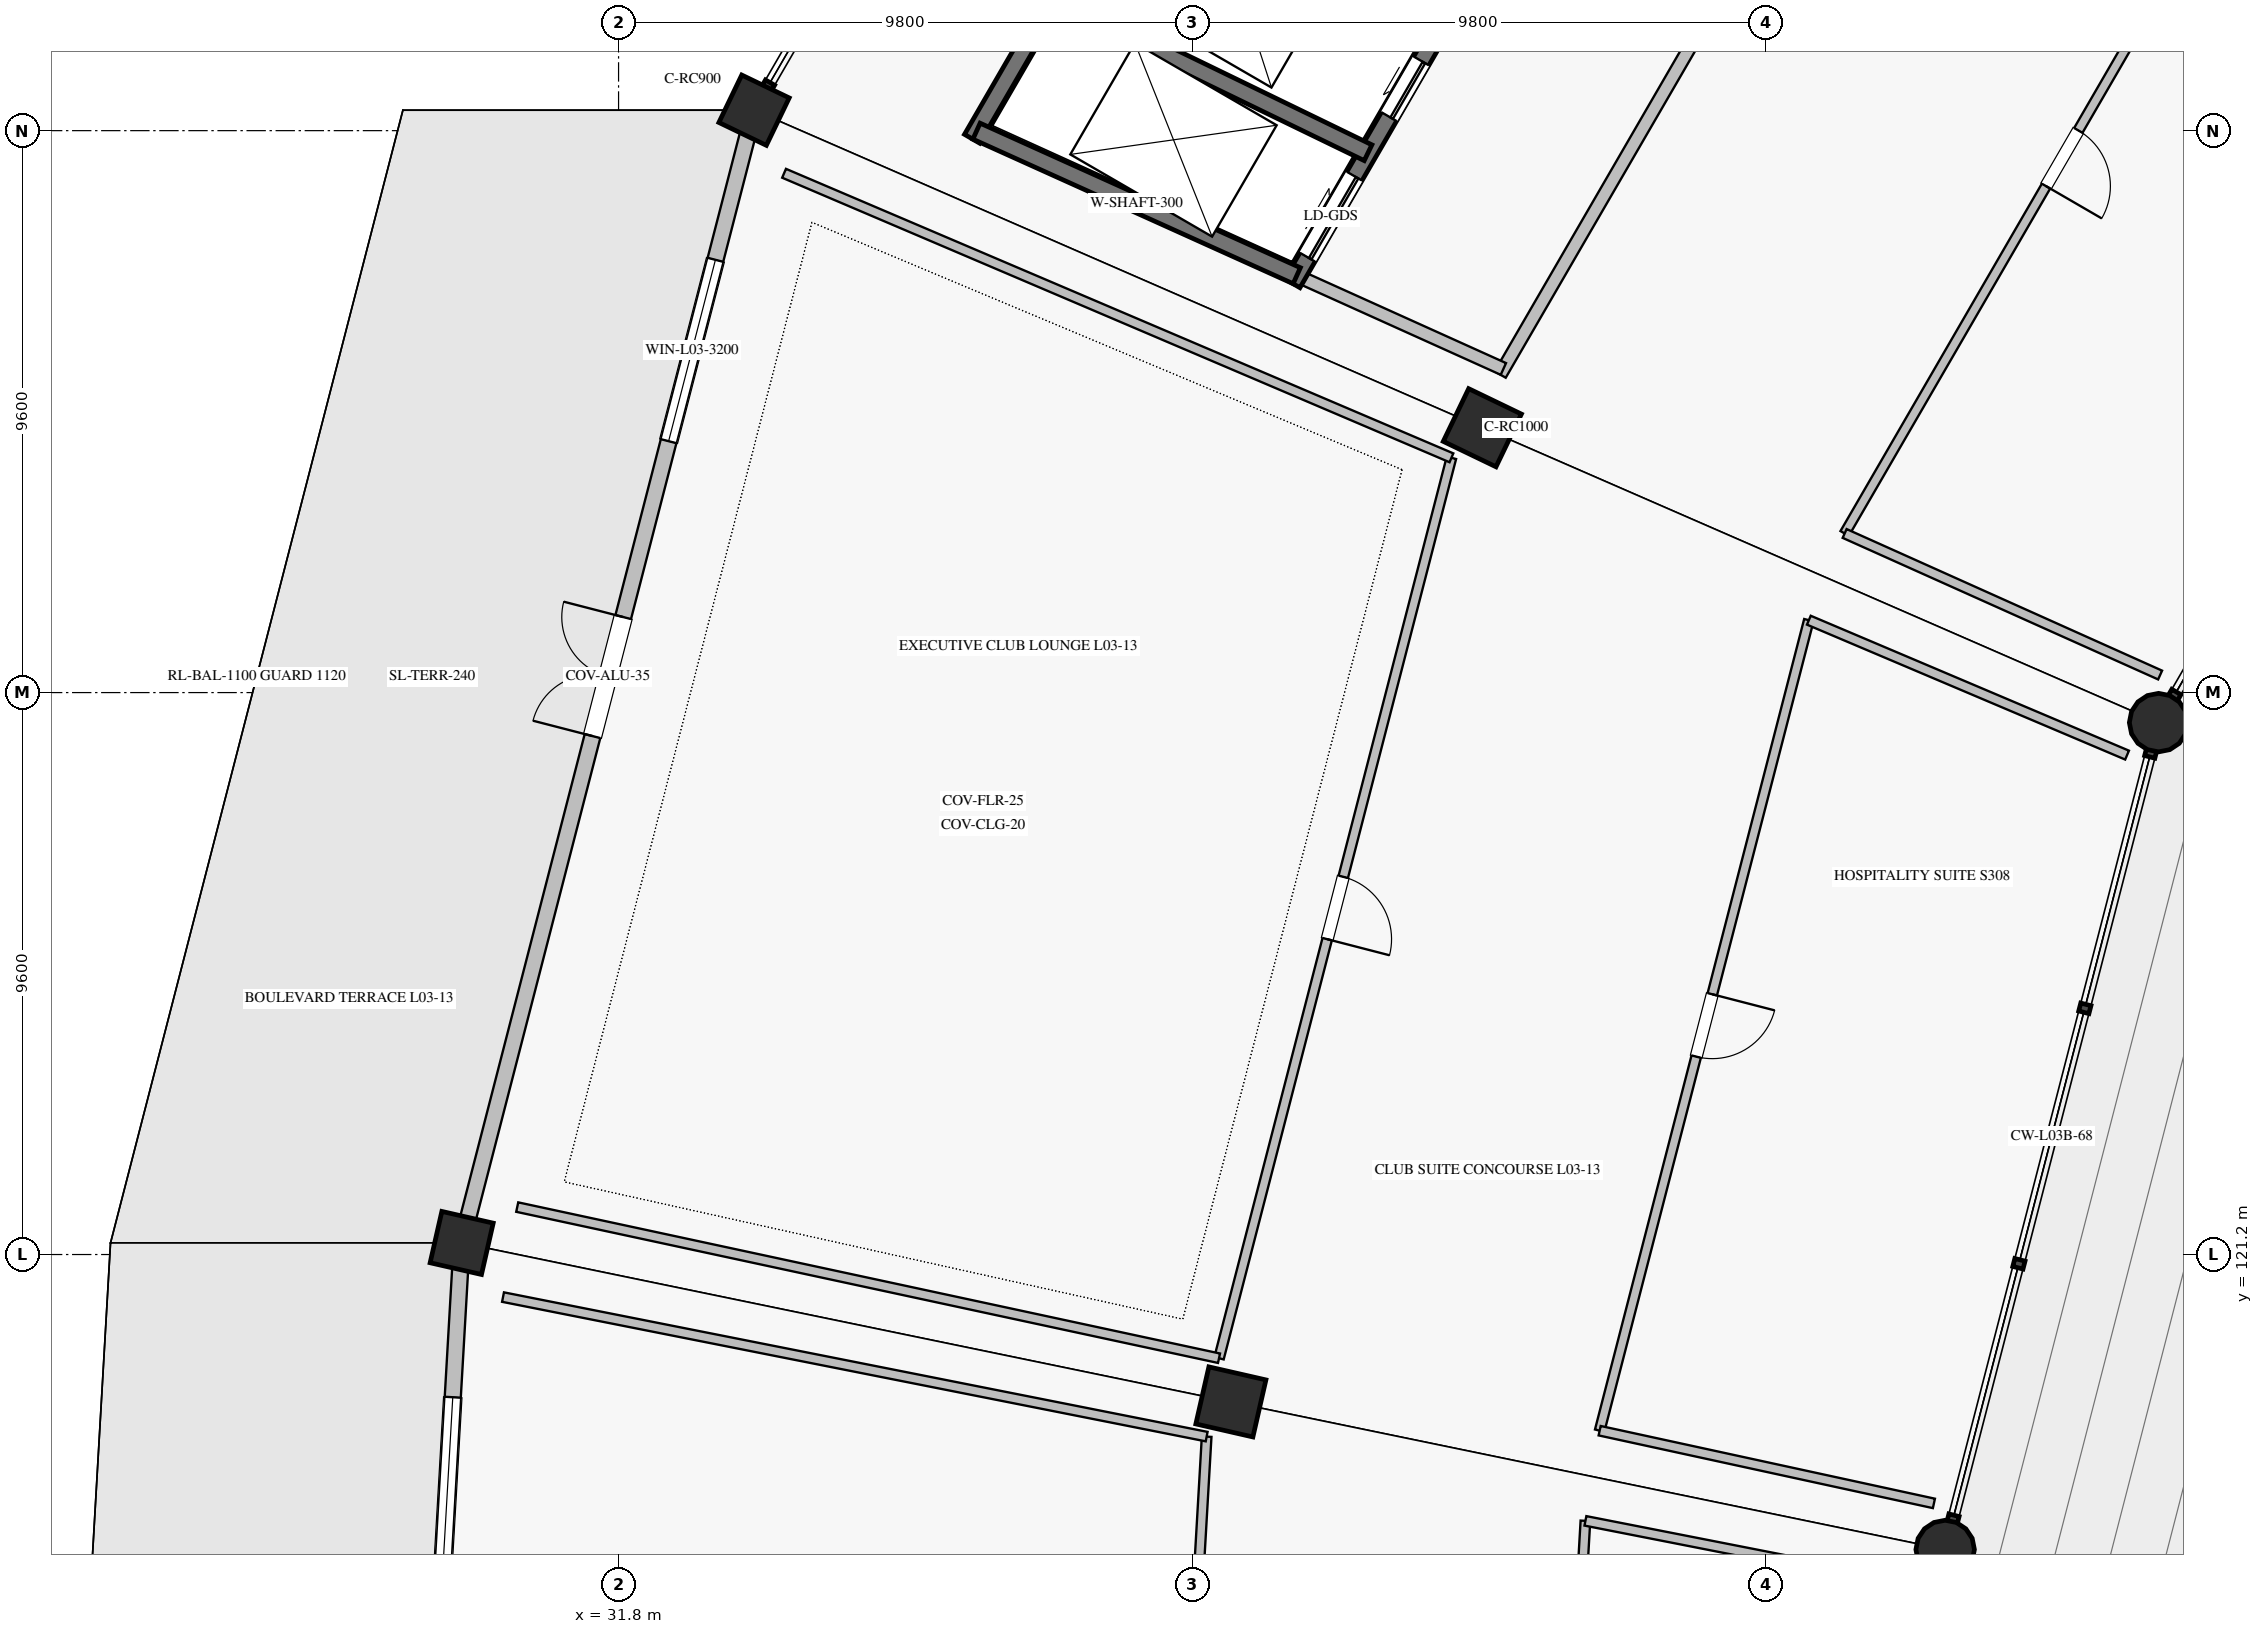
"""IFC4 building model, lengths in metres.
Left out: names, types, materials, properties, quantities, classifications, styles, units other than length and angle.
Written with IfcOpenShell. Run it as: python <this file> out.ifc"""

import sys

from ifc_helpers import new_model, si_unit, direction, frame, frame_2d, origin, origin_2d, place, context, subcontext, project, spatial, rectangle, circle, extrude, element, fill, save


model = new_model("IFC4")
c1 = context("Model", 3, precision=1e-05, world=origin(), true_north=direction((0.0, 1.0)))
c2 = subcontext(c1, "Body", "Model", "MODEL_VIEW")
j1 = project(units=[si_unit("LENGTHUNIT", "METRE"), si_unit("PLANEANGLEUNIT", "RADIAN")], contexts=[c1])
p1 = place(None, origin())
s1 = spatial("IfcSite", under=j1, at=p1, CompositionType="ELEMENT")
p2 = place(p1, origin())
s2 = spatial("IfcBuilding", under=s1, at=p2, CompositionType="ELEMENT")
p3 = place(p2, frame((0.0, 0.0, 15.64)))
s3 = spatial("IfcBuildingStorey", under=s2, at=p3, CompositionType="ELEMENT", Elevation=15.64)
for number, where, z_axis, x_axis in (
    (1, (58.114, 130.287, 0.0), (0.0, 0.0, 1.0), (-0.901, 0.434, 0.0)),
    (2, (54.467, 116.16, 0.0), (0.0, 0.0, 1.0), (-0.975, 0.223, 0.0)),
):
    element("IfcColumn", number, at=place(p3, frame(where, z_axis=z_axis, x_axis=x_axis)), inside=s3, PredefinedType="COLUMN", context=c2, shape_type="SweptSolid", body=[
        extrude(circle(Radius=0.5, at=origin_2d()), origin(), (0.0, 0.0, 1.0), 4.76),
    ])
for number, where, z_axis, x_axis in (
    (3, (46.559, 135.325, 0.0), (0.0, 0.0, 1.0), (-0.901, 0.434, 0.0)),
    (4, (42.262, 118.682, 0.0), (0.0, 0.0, 1.0), (-0.975, 0.223, 0.0)),
):
    element("IfcColumn", number, at=place(p3, frame(where, z_axis=z_axis, x_axis=x_axis)), inside=s3, PredefinedType="COLUMN", context=c2, shape_type="SweptSolid", body=[
        extrude(rectangle(XDim=1.0, YDim=1.0, at=origin_2d()), origin(), (0.0, 0.0, 1.0), 4.76),
    ])
for number, where, z_axis, x_axis in (
    (5, (34.115, 140.75, 0.0), (0.0, 0.0, 1.0), (-0.901, 0.434, 0.0)),
    (6, (29.119, 121.398, 0.0), (0.0, 0.0, 1.0), (-0.975, 0.223, 0.0)),
):
    element("IfcColumn", number, at=place(p3, frame(where, z_axis=z_axis, x_axis=x_axis)), inside=s3, PredefinedType="COLUMN", context=c2, shape_type="SweptSolid", body=[
        extrude(rectangle(XDim=0.9, YDim=0.9, at=origin_2d()), origin(), (0.0, 0.0, 1.0), 4.76),
    ])
p4 = place(p3, frame((34.005, 140.323, 0.0), z_axis=(0.0, 0.0, 1.0), x_axis=(-0.2499638116, -0.968255179635, 0.0)))
e7 = element("IfcWall", 7, at=p4, inside=s3, PredefinedType="SOLIDWALL", context=c2, shape_type="SweptSolid", body=[
    extrude(rectangle(XDim=19.106, YDim=0.275, at=frame_2d((9.553, 0.0))), origin(), (0.0, 0.0, 1.0), 3.81),
])
p5 = place(p4, frame((8.503, 0.0, 0.0)))
e8 = element("IfcOpeningElement", 8, at=p5, cuts=e7, PredefinedType="OPENING", context=c2, shape_type="SweptSolid", body=[
    extrude(rectangle(XDim=2.1, YDim=2.4, at=frame_2d((1.05, 1.2))), frame((0.0, 0.147, 0.0), z_axis=(0.0, -1.0, 0.0), x_axis=(1.0, 0.0, 0.0)), (0.0, 0.0, 1.0), 0.295),
])
p6 = place(p4, frame((2.2, 0.0, 0.9)))
e9 = element("IfcOpeningElement", 9, at=p6, cuts=e7, PredefinedType="OPENING", context=c2, shape_type="SweptSolid", body=[
    extrude(rectangle(XDim=3.2, YDim=2.2, at=frame_2d((1.6, 1.1))), frame((0.0, 0.147, 0.0), z_axis=(0.0, -1.0, 0.0), x_axis=(1.0, 0.0, 0.0)), (0.0, 0.0, 1.0), 0.295),
])
p7 = place(p3, frame((29.094, 120.958, 0.0), z_axis=(0.0, 0.0, 1.0), x_axis=(-0.05759325572, -0.998340130865, 0.0)))
e10 = element("IfcWall", 10, at=p7, inside=s3, PredefinedType="SOLIDWALL", context=c2, shape_type="SweptSolid", body=[
    extrude(rectangle(XDim=18.55, YDim=0.275, at=frame_2d((9.275, 0.0))), origin(), (0.0, 0.0, 1.0), 3.81),
])
p8 = place(p7, frame((8.225, 0.0, 0.0)))
e11 = element("IfcOpeningElement", 11, at=p8, cuts=e10, PredefinedType="OPENING", context=c2, shape_type="SweptSolid", body=[
    extrude(rectangle(XDim=2.1, YDim=2.4, at=frame_2d((1.05, 1.2))), frame((0.0, 0.147, 0.0), z_axis=(0.0, -1.0, 0.0), x_axis=(1.0, 0.0, 0.0)), (0.0, 0.0, 1.0), 0.295),
])
p9 = place(p7, frame((2.2, 0.0, 0.9)))
e12 = element("IfcOpeningElement", 12, at=p9, cuts=e10, PredefinedType="OPENING", context=c2, shape_type="SweptSolid", body=[
    extrude(rectangle(XDim=3.2, YDim=2.2, at=frame_2d((1.6, 1.1))), frame((0.0, 0.147, 0.0), z_axis=(0.0, -1.0, 0.0), x_axis=(1.0, 0.0, 0.0)), (0.0, 0.0, 1.0), 0.295),
])
p10 = place(p3, frame((45.9, 142.254, 0.0), z_axis=(0.0, 0.0, 1.0), x_axis=(-0.501629534056, -0.86508254552, 0.0)))
e13 = element("IfcWall", 13, at=p10, inside=s3, PredefinedType="SHEAR", context=c2, shape_type="SweptSolid", body=[
    extrude(rectangle(XDim=5.157, YDim=0.3, at=frame_2d((2.579, 0.0))), origin(), (0.0, 0.0, 1.0), 4.46),
])
p11 = place(p10, frame((0.766, 0.0, 0.0)))
e14 = element("IfcOpeningElement", 14, at=p11, cuts=e13, PredefinedType="OPENING", context=c2, shape_type="SweptSolid", body=[
    extrude(rectangle(XDim=1.1, YDim=2.2, at=frame_2d((0.55, 1.1))), frame((0.0, 0.16, 0.0), z_axis=(0.0, -1.0, 0.0), x_axis=(1.0, 0.0, 0.0)), (0.0, 0.0, 1.0), 0.32),
])
p12 = place(p10, frame((3.042, 0.0, 0.0)))
e15 = element("IfcOpeningElement", 15, at=p12, cuts=e13, PredefinedType="OPENING", context=c2, shape_type="SweptSolid", body=[
    extrude(rectangle(XDim=1.6, YDim=2.3, at=frame_2d((0.8, 1.15))), frame((0.0, 0.16, 0.0), z_axis=(0.0, -1.0, 0.0), x_axis=(1.0, 0.0, 0.0)), (0.0, 0.0, 1.0), 0.32),
])
p13 = place(p3, frame((40.595, 145.012, 0.0), z_axis=(0.0, 0.0, 1.0), x_axis=(-0.501630260479, -0.865082124293, 0.0)))
e16 = element("IfcWall", 16, at=p13, inside=s3, PredefinedType="SHEAR", context=c2, shape_type="SweptSolid", body=[
    extrude(rectangle(XDim=5.491, YDim=0.3, at=frame_2d((2.746, 0.0))), origin(), (0.0, 0.0, 1.0), 4.46),
])
p14 = place(p3, frame((43.388, 137.922, 0.0), z_axis=(0.0, 0.0, 1.0), x_axis=(-0.911521602376, 0.41125219562, 0.0)))
e17 = element("IfcWall", 17, at=p14, inside=s3, PredefinedType="SHEAR", context=c2, shape_type="SweptSolid", body=[
    extrude(rectangle(XDim=6.004, YDim=0.3, at=frame_2d((3.002, 0.0))), origin(), (0.0, 0.0, 1.0), 4.46),
])
p15 = place(p3, frame((44.606, 140.023, 0.0), z_axis=(0.0, 0.0, 1.0), x_axis=(-0.899759302591, 0.436386522936, 0.0)))
e18 = element("IfcWall", 18, at=p15, inside=s3, PredefinedType="SHEAR", context=c2, shape_type="SweptSolid", body=[
    extrude(rectangle(XDim=5.989, YDim=0.3, at=frame_2d((2.995, 0.0))), origin(), (0.0, 0.0, 1.0), 4.46),
])
p16 = place(p3, frame((54.944, 150.17, 0.0), z_axis=(0.0, 0.0, 1.0), x_axis=(-0.501612626242, -0.865092349518, 0.0)))
e19 = element("IfcWall", 19, at=p16, inside=s3, PredefinedType="SOLIDWALL", context=c2, shape_type="SweptSolid", body=[
    extrude(rectangle(XDim=16.11, YDim=0.22, at=frame_2d((8.055, 0.0))), origin(), (0.0, 0.0, 1.0), 4.46),
])
p17 = place(p16, frame((6.511, 0.0, 0.0)))
e20 = element("IfcOpeningElement", 20, at=p17, cuts=e19, PredefinedType="OPENING", context=c2, shape_type="SweptSolid", body=[
    extrude(rectangle(XDim=1.5, YDim=2.2, at=frame_2d((0.75, 1.1))), frame((0.0, 0.12, 0.0), z_axis=(0.0, -1.0, 0.0), x_axis=(1.0, 0.0, 0.0)), (0.0, 0.0, 1.0), 0.24),
])
p18 = place(p3, frame((46.918, 136.329, 0.0), z_axis=(0.0, 0.0, 1.0), x_axis=(-0.91149641055, 0.411308027582, 0.0)))
e21 = element("IfcWall", 21, at=p18, inside=s3, PredefinedType="SOLIDWALL", context=c2, shape_type="SweptSolid", body=[
    extrude(rectangle(XDim=3.873, YDim=0.22, at=frame_2d((1.937, 0.0))), origin(), (0.0, 0.0, 1.0), 4.46),
])
p19 = place(p3, frame((46.031, 134.811, 0.0), z_axis=(0.0, 0.0, 1.0), x_axis=(-0.249970043824, -0.968253570709, 0.0)))
e22 = element("IfcWall", 22, at=p19, inside=s3, PredefinedType="PARTITIONING", context=c2, shape_type="SweptSolid", body=[
    extrude(rectangle(XDim=15.887, YDim=0.165, at=frame_2d((7.943, 0.0))), origin(), (0.0, 0.0, 1.0), 3.78),
])
p20 = place(p19, frame((7.393, 0.0, 0.0)))
e23 = element("IfcOpeningElement", 23, at=p20, cuts=e22, PredefinedType="OPENING", context=c2, shape_type="SweptSolid", body=[
    extrude(rectangle(XDim=1.1, YDim=2.25, at=frame_2d((0.55, 1.125))), frame((0.0, 0.093, 0.0), z_axis=(0.0, -1.0, 0.0), x_axis=(1.0, 0.0, 0.0)), (0.0, 0.0, 1.0), 0.185),
])
p21 = place(p3, frame((46.031, 134.811, 0.0), z_axis=(0.0, 0.0, 1.0), x_axis=(-0.919905328402, 0.392140519173, 0.0)))
e24 = element("IfcWall", 24, at=p21, inside=s3, PredefinedType="PARTITIONING", context=c2, shape_type="SweptSolid", body=[
    extrude(rectangle(XDim=12.396, YDim=0.165, at=frame_2d((6.198, 0.0))), origin(), (0.0, 0.0, 1.0), 3.78),
])
p22 = place(p3, frame((42.06, 119.428, 0.0), z_axis=(0.0, 0.0, 1.0), x_axis=(-0.97759337709, 0.210502230558, 0.0)))
e25 = element("IfcWall", 25, at=p22, inside=s3, PredefinedType="PARTITIONING", context=c2, shape_type="SweptSolid", body=[
    extrude(rectangle(XDim=12.266, YDim=0.165, at=frame_2d((6.133, 0.0))), origin(), (0.0, 0.0, 1.0), 3.78),
])
p23 = place(p3, frame((41.848, 118.089, 0.0), z_axis=(0.0, 0.0, 1.0), x_axis=(-0.057603503798, -0.998339539611, 0.0)))
e26 = element("IfcWall", 26, at=p23, inside=s3, PredefinedType="PARTITIONING", context=c2, shape_type="SweptSolid", body=[
    extrude(rectangle(XDim=15.444, YDim=0.165, at=frame_2d((7.722, 0.0))), origin(), (0.0, 0.0, 1.0), 3.78),
])
p24 = place(p23, frame((6.922, 0.0, 0.0)))
e27 = element("IfcOpeningElement", 27, at=p24, cuts=e26, PredefinedType="OPENING", context=c2, shape_type="SweptSolid", body=[
    extrude(rectangle(XDim=1.6, YDim=2.3, at=frame_2d((0.8, 1.15))), frame((0.0, 0.093, 0.0), z_axis=(0.0, -1.0, 0.0), x_axis=(1.0, 0.0, 0.0)), (0.0, 0.0, 1.0), 0.185),
])
p25 = place(p3, frame((41.848, 118.089, 0.0), z_axis=(0.0, 0.0, 1.0), x_axis=(-0.980904167784, 0.194491680088, 0.0)))
e28 = element("IfcWall", 28, at=p25, inside=s3, PredefinedType="PARTITIONING", context=c2, shape_type="SweptSolid", body=[
    extrude(rectangle(XDim=12.257, YDim=0.165, at=frame_2d((6.128, 0.0))), origin(), (0.0, 0.0, 1.0), 3.78),
])
p26 = place(p3, frame((60.183, 146.339, 0.0), z_axis=(0.0, 0.0, 1.0), x_axis=(-0.501600484117, -0.865099389859, 0.0)))
e29 = element("IfcWall", 29, at=p26, inside=s3, PredefinedType="PARTITIONING", context=c2, shape_type="SweptSolid", body=[
    extrude(rectangle(XDim=14.82, YDim=0.165, at=frame_2d((7.41, 0.0))), origin(), (0.0, 0.0, 1.0), 3.78),
])
p27 = place(p26, frame((6.86, 0.0, 0.0)))
e30 = element("IfcOpeningElement", 30, at=p27, cuts=e29, PredefinedType="OPENING", context=c2, shape_type="SweptSolid", body=[
    extrude(rectangle(XDim=1.1, YDim=2.25, at=frame_2d((0.55, 1.125))), frame((0.0, 0.093, 0.0), z_axis=(0.0, -1.0, 0.0), x_axis=(1.0, 0.0, 0.0)), (0.0, 0.0, 1.0), 0.185),
])
p28 = place(p3, frame((52.75, 133.518, 0.0), z_axis=(0.0, 0.0, 1.0), x_axis=(0.912386411317, -0.409329984785, 0.0)))
e31 = element("IfcWall", 31, at=p28, inside=s3, PredefinedType="PARTITIONING", context=c2, shape_type="SweptSolid", body=[
    extrude(rectangle(XDim=5.908, YDim=0.165, at=frame_2d((2.954, 0.0))), origin(), (0.0, 0.0, 1.0), 3.78),
])
p29 = place(p3, frame((52.138, 132.037, 0.0), z_axis=(0.0, 0.0, 1.0), x_axis=(-0.24997612238, -0.968252001413, 0.0)))
e32 = element("IfcWall", 32, at=p29, inside=s3, PredefinedType="PARTITIONING", context=c2, shape_type="SweptSolid", body=[
    extrude(rectangle(XDim=14.3, YDim=0.165, at=frame_2d((7.15, 0.0))), origin(), (0.0, 0.0, 1.0), 3.78),
])
p30 = place(p29, frame((6.6, 0.0, 0.0)))
e33 = element("IfcOpeningElement", 33, at=p30, cuts=e32, PredefinedType="OPENING", context=c2, shape_type="SweptSolid", body=[
    extrude(rectangle(XDim=1.1, YDim=2.25, at=frame_2d((0.55, 1.125))), frame((0.0, 0.093, 0.0), z_axis=(0.0, -1.0, 0.0), x_axis=(1.0, 0.0, 0.0)), (0.0, 0.0, 1.0), 0.185),
])
p31 = place(p3, frame((52.138, 132.037, 0.0), z_axis=(0.0, 0.0, 1.0), x_axis=(0.920705147611, -0.390258928357, 0.0)))
e34 = element("IfcWall", 34, at=p31, inside=s3, PredefinedType="PARTITIONING", context=c2, shape_type="SweptSolid", body=[
    extrude(rectangle(XDim=5.906, YDim=0.165, at=frame_2d((2.953, 0.0))), origin(), (0.0, 0.0, 1.0), 3.78),
])
p32 = place(p3, frame((48.563, 118.19, 0.0), z_axis=(0.0, 0.0, 1.0), x_axis=(0.977149214651, -0.212554492557, 0.0)))
e35 = element("IfcWall", 35, at=p32, inside=s3, PredefinedType="PARTITIONING", context=c2, shape_type="SweptSolid", body=[
    extrude(rectangle(XDim=5.845, YDim=0.165, at=frame_2d((2.923, 0.0))), origin(), (0.0, 0.0, 1.0), 3.78),
])
p33 = place(p3, frame((48.32, 116.65, 0.0), z_axis=(0.0, 0.0, 1.0), x_axis=(-0.057600910845, -0.998339689219, 0.0)))
e36 = element("IfcWall", 36, at=p33, inside=s3, PredefinedType="PARTITIONING", context=c2, shape_type="SweptSolid", body=[
    extrude(rectangle(XDim=13.902, YDim=0.165, at=frame_2d((6.951, 0.0))), origin(), (0.0, 0.0, 1.0), 3.78),
])
p34 = place(p33, frame((6.401, 0.0, 0.0)))
e37 = element("IfcOpeningElement", 37, at=p34, cuts=e36, PredefinedType="OPENING", context=c2, shape_type="SweptSolid", body=[
    extrude(rectangle(XDim=1.1, YDim=2.25, at=frame_2d((0.55, 1.125))), frame((0.0, 0.093, 0.0), z_axis=(0.0, -1.0, 0.0), x_axis=(1.0, 0.0, 0.0)), (0.0, 0.0, 1.0), 0.185),
])
p35 = place(p3, frame((48.32, 116.65, 0.0), z_axis=(0.0, 0.0, 1.0), x_axis=(0.981299196532, -0.192488666901, 0.0)))
e38 = element("IfcWall", 38, at=p35, inside=s3, PredefinedType="PARTITIONING", context=c2, shape_type="SweptSolid", body=[
    extrude(rectangle(XDim=5.839, YDim=0.165, at=frame_2d((2.92, 0.0))), origin(), (0.0, 0.0, 1.0), 3.78),
])
p36 = place(p5, frame((2.1, 0.0, 0.0), z_axis=(0.0, 0.0, 1.0), x_axis=(-1.0, 0.0, 0.0)))
e39 = element("IfcDoor", 39, at=p36, inside=s3, OperationType="DOUBLE_DOOR_SINGLE_SWING", PredefinedType="DOOR", context=c2, shape_type="SweptSolid", body=[
    extrude(rectangle(XDim=2.1, YDim=2.4, at=frame_2d((1.05, 1.2))), frame((0.0, 0.025, 0.0), z_axis=(0.0, -1.0, 0.0), x_axis=(1.0, 0.0, 0.0)), (0.0, 0.0, 1.0), 0.05),
])
fill(e8, e39)
p37 = place(p6, origin())
e40 = element("IfcWindow", 40, at=p37, inside=s3, PartitioningType="SINGLE_PANEL", PredefinedType="WINDOW", context=c2, shape_type="SweptSolid", body=[
    extrude(rectangle(XDim=3.2, YDim=2.2, at=frame_2d((1.6, 1.1))), frame((0.0, 0.03, 0.0), z_axis=(0.0, -1.0, 0.0), x_axis=(1.0, 0.0, 0.0)), (0.0, 0.0, 1.0), 0.06),
])
fill(e9, e40)
p38 = place(p9, origin())
e41 = element("IfcWindow", 41, at=p38, inside=s3, PartitioningType="SINGLE_PANEL", PredefinedType="WINDOW", context=c2, shape_type="SweptSolid", body=[
    extrude(rectangle(XDim=3.2, YDim=2.2, at=frame_2d((1.6, 1.1))), frame((0.0, 0.03, 0.0), z_axis=(0.0, -1.0, 0.0), x_axis=(1.0, 0.0, 0.0)), (0.0, 0.0, 1.0), 0.06),
])
fill(e12, e41)
p39 = place(p11, origin())
e42 = element("IfcDoor", 42, at=p39, inside=s3, OperationType="SLIDING_TO_RIGHT", PredefinedType="DOOR", context=c2, shape_type="SweptSolid", body=[
    extrude(rectangle(XDim=1.1, YDim=2.2, at=frame_2d((0.55, 1.1))), frame((0.0, 0.025, 0.0), z_axis=(0.0, -1.0, 0.0), x_axis=(1.0, 0.0, 0.0)), (0.0, 0.0, 1.0), 0.05),
])
fill(e14, e42)
p40 = place(p12, origin())
e43 = element("IfcDoor", 43, at=p40, inside=s3, OperationType="SLIDING_TO_LEFT", PredefinedType="DOOR", context=c2, shape_type="SweptSolid", body=[
    extrude(rectangle(XDim=1.6, YDim=2.3, at=frame_2d((0.8, 1.15))), frame((0.0, 0.025, 0.0), z_axis=(0.0, -1.0, 0.0), x_axis=(1.0, 0.0, 0.0)), (0.0, 0.0, 1.0), 0.05),
])
fill(e15, e43)
p41 = place(p20, origin())
e44 = element("IfcDoor", 44, at=p41, inside=s3, OperationType="SINGLE_SWING_RIGHT", PredefinedType="DOOR", context=c2, shape_type="SweptSolid", body=[
    extrude(rectangle(XDim=1.1, YDim=2.25, at=frame_2d((0.55, 1.125))), frame((0.0, 0.025, 0.0), z_axis=(0.0, -1.0, 0.0), x_axis=(1.0, 0.0, 0.0)), (0.0, 0.0, 1.0), 0.05),
])
fill(e23, e44)
p42 = place(p27, origin())
e45 = element("IfcDoor", 45, at=p42, inside=s3, OperationType="SINGLE_SWING_RIGHT", PredefinedType="DOOR", context=c2, shape_type="SweptSolid", body=[
    extrude(rectangle(XDim=1.1, YDim=2.25, at=frame_2d((0.55, 1.125))), frame((0.0, 0.025, 0.0), z_axis=(0.0, -1.0, 0.0), x_axis=(1.0, 0.0, 0.0)), (0.0, 0.0, 1.0), 0.05),
])
fill(e30, e45)
p43 = place(p30, origin())
e46 = element("IfcDoor", 46, at=p43, inside=s3, OperationType="SINGLE_SWING_LEFT", PredefinedType="DOOR", context=c2, shape_type="SweptSolid", body=[
    extrude(rectangle(XDim=1.1, YDim=2.25, at=frame_2d((0.55, 1.125))), frame((0.0, 0.025, 0.0), z_axis=(0.0, -1.0, 0.0), x_axis=(1.0, 0.0, 0.0)), (0.0, 0.0, 1.0), 0.05),
])
fill(e33, e46)
save(model, sys.argv[1])
